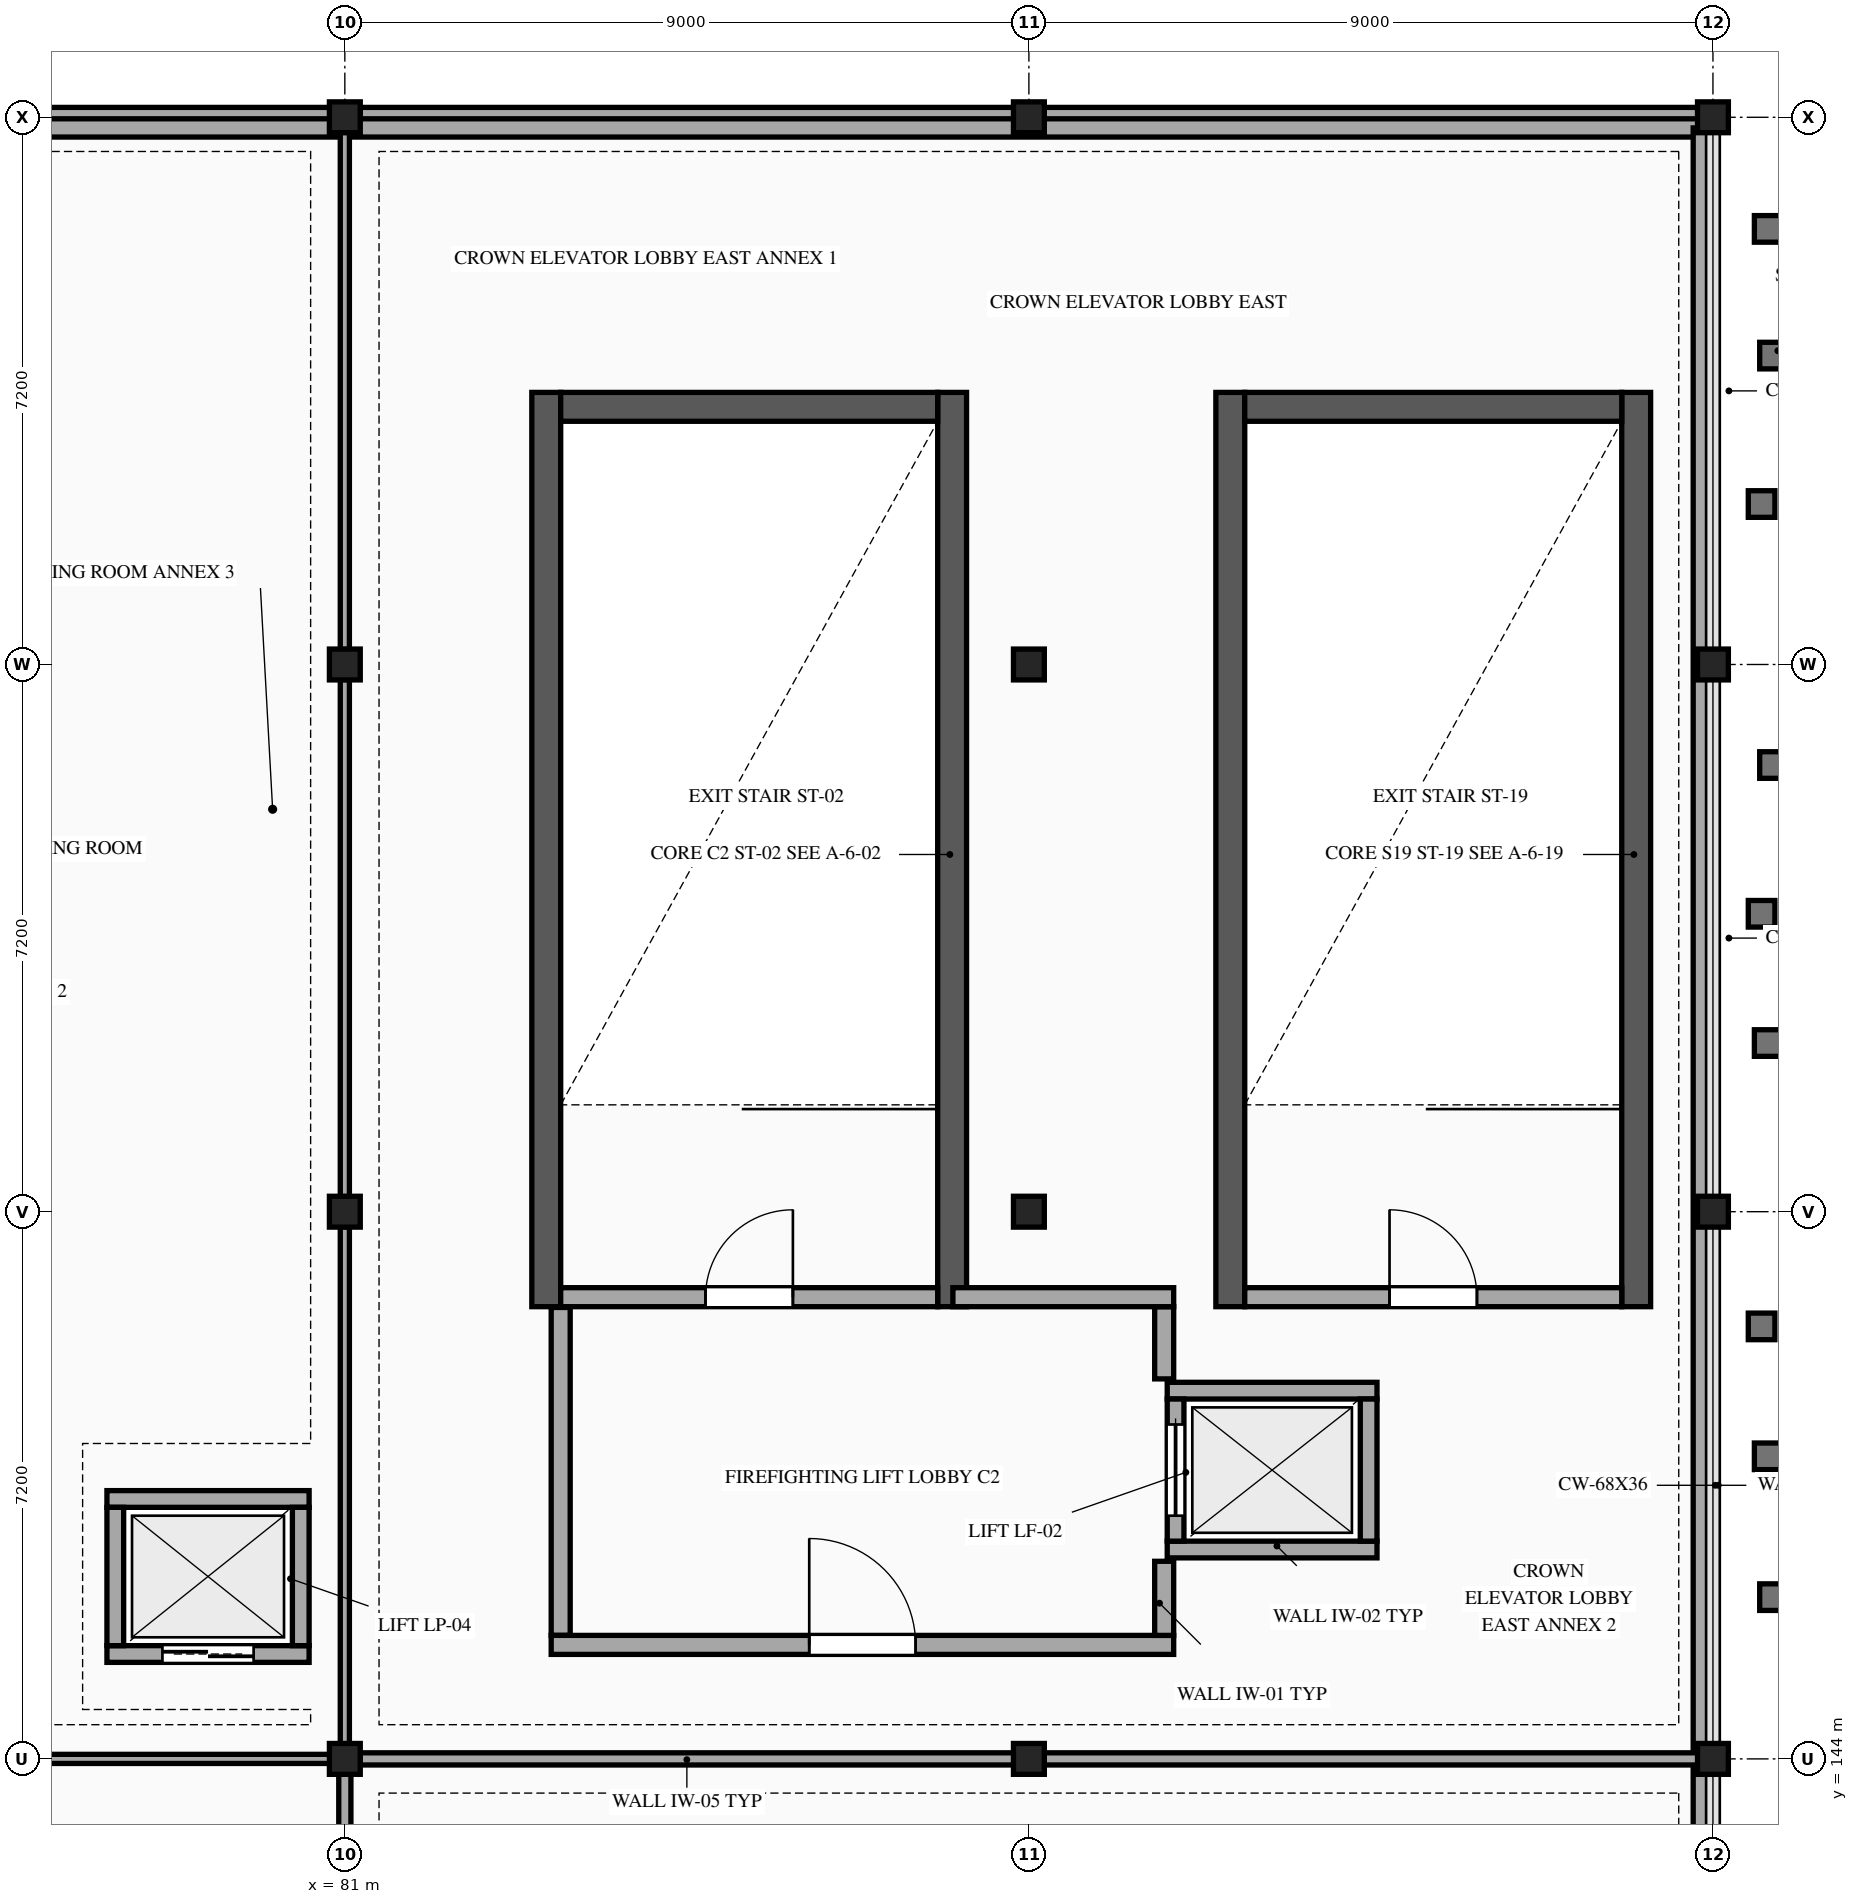
"""IFC4 building model, lengths in metres.
Left out: names, types, materials, properties, quantities, classifications, styles, units other than length and angle.
Written with IfcOpenShell. Run it as: python <this file> out.ifc"""

import sys

from ifc_helpers import new_model, si_unit, direction, frame, frame_2d, origin, origin_2d, place, context, subcontext, project, spatial, rectangle, hollow_circle, extrude, element, fill, save


model = new_model("IFC4")
c1 = context("Model", 3, precision=1e-05, world=origin(), true_north=direction((0.0, 1.0)))
c2 = subcontext(c1, "Body", "Model", "MODEL_VIEW")
j1 = project(units=[si_unit("LENGTHUNIT", "METRE"), si_unit("PLANEANGLEUNIT", "RADIAN")], contexts=[c1])
p1 = place(None, origin())
s1 = spatial("IfcSite", under=j1, at=p1, CompositionType="ELEMENT")
p2 = place(p1, origin())
s2 = spatial("IfcBuilding", under=s1, at=p2, CompositionType="ELEMENT")
p3 = place(p2, frame((0.0, 0.0, 24.3)))
s3 = spatial("IfcBuildingStorey", under=s2, at=p3, CompositionType="ELEMENT", Elevation=24.3)
for number, where, z_axis, x_axis in (
    (1, (81.0, 144.0, 0.0), (0.0, 0.0, 1.0), (1.0, 0.0, 0.0)),
    (2, (81.0, 151.2, 0.0), (0.0, 0.0, 1.0), (1.0, 0.0, 0.0)),
    (3, (81.0, 158.4, 0.0), (0.0, 0.0, 1.0), (1.0, 0.0, 0.0)),
    (4, (81.0, 165.6, 0.0), (0.0, 0.0, 1.0), (1.0, 0.0, 0.0)),
    (5, (90.0, 144.0, 0.0), (0.0, 0.0, 1.0), (1.0, 0.0, 0.0)),
    (6, (90.0, 151.2, 0.0), (0.0, 0.0, 1.0), (1.0, 0.0, 0.0)),
    (7, (90.0, 158.4, 0.0), (0.0, 0.0, 1.0), (1.0, 0.0, 0.0)),
    (8, (90.0, 165.6, 0.0), (0.0, 0.0, 1.0), (1.0, 0.0, 0.0)),
    (9, (99.0, 144.0, 0.0), (0.0, 0.0, 1.0), (1.0, 0.0, 0.0)),
    (10, (99.0, 151.2, 0.0), (0.0, 0.0, 1.0), (1.0, 0.0, 0.0)),
    (11, (99.0, 158.4, 0.0), (0.0, 0.0, 1.0), (1.0, 0.0, 0.0)),
    (12, (99.0, 165.6, 0.0), (0.0, 0.0, 1.0), (1.0, 0.0, 0.0)),
):
    element("IfcColumn", number, at=place(p3, frame(where, z_axis=z_axis, x_axis=x_axis)), inside=s3, PredefinedType="COLUMN", context=c2, shape_type="SweptSolid", body=[
        extrude(hollow_circle(Radius=0.203, WallThickness=0.014, at=origin_2d()), origin(), (0.0, 0.0, 1.0), 4.5),
    ])
for number, where, z_axis, x_axis in (
    (13, (83.65, 149.95, 0.0), (0.0, 0.0, 1.0), (0.0, 1.0, 0.0)),
    (14, (88.99, 161.98, 0.0), (0.0, 0.0, 1.0), (0.0, -1.0, 0.0)),
):
    element("IfcWall", number, at=place(p3, frame(where, z_axis=z_axis, x_axis=x_axis)), inside=s3, PredefinedType="SHEAR", context=c2, shape_type="SweptSolid", body=[
        extrude(rectangle(XDim=12.03, YDim=0.38, at=frame_2d((6.015, 0.0))), origin(), (0.0, 0.0, 1.0), 4.26),
    ])
p4 = place(p3, frame((83.84, 161.79, 0.0), z_axis=(0.0, 0.0, 1.0), x_axis=(1.0, 0.0, 0.0)))
e15 = element("IfcWall", 15, at=p4, inside=s3, PredefinedType="SHEAR", context=c2, shape_type="SweptSolid", body=[
    extrude(rectangle(XDim=4.96, YDim=0.38, at=frame_2d((2.48, 0.0))), origin(), (0.0, 0.0, 1.0), 4.26),
])
for number, where, z_axis, x_axis in (
    (16, (92.65, 149.95, 0.0), (0.0, 0.0, 1.0), (0.0, 1.0, 0.0)),
    (17, (97.99, 161.98, 0.0), (0.0, 0.0, 1.0), (0.0, -1.0, 0.0)),
):
    element("IfcWall", number, at=place(p3, frame(where, z_axis=z_axis, x_axis=x_axis)), inside=s3, PredefinedType="SHEAR", context=c2, shape_type="SweptSolid", body=[
        extrude(rectangle(XDim=12.03, YDim=0.38, at=frame_2d((6.015, 0.0))), origin(), (0.0, 0.0, 1.0), 4.26),
    ])
p5 = place(p3, frame((92.84, 161.79, 0.0), z_axis=(0.0, 0.0, 1.0), x_axis=(1.0, 0.0, 0.0)))
e18 = element("IfcWall", 18, at=p5, inside=s3, PredefinedType="SHEAR", context=c2, shape_type="SweptSolid", body=[
    extrude(rectangle(XDim=4.96, YDim=0.38, at=frame_2d((2.48, 0.0))), origin(), (0.0, 0.0, 1.0), 4.26),
])
for number, where, z_axis, x_axis in (
    (19, (72.199, 165.6, 0.0), (0.0, 0.0, 1.0), (1.0, 0.0, 0.0)),
    (20, (81.199, 165.6, 0.0), (0.0, 0.0, 1.0), (1.0, 0.0, 0.0)),
    (21, (90.199, 165.6, 0.0), (0.0, 0.0, 1.0), (1.0, 0.0, 0.0)),
):
    element("IfcWall", number, at=place(p3, frame(where, z_axis=z_axis, x_axis=x_axis)), inside=s3, PredefinedType="STANDARD", context=c2, shape_type="SweptSolid", body=[
        extrude(rectangle(XDim=8.602, YDim=0.26, at=frame_2d((4.301, 0.0))), origin(), (0.0, 0.0, 1.0), 3.648),
    ])
p6 = place(p3, frame((36.14, 165.46, 4.5), z_axis=(0.0, 0.0, 1.0), x_axis=(1.0, 0.0, 0.0)))
e22 = element("IfcWall", 22, at=p6, inside=s3, PredefinedType="PARAPET", context=c2, shape_type="SweptSolid", body=[
    extrude(rectangle(XDim=62.72, YDim=0.24, at=frame_2d((31.36, 0.0))), origin(), (0.0, 0.0, 1.0), 0.65),
])
p7 = place(p3, frame((98.86, 165.46, 4.5), z_axis=(0.0, 0.0, 1.0), x_axis=(0.0, -1.0, 0.0)))
e23 = element("IfcWall", 23, at=p7, inside=s3, PredefinedType="PARAPET", context=c2, shape_type="SweptSolid", body=[
    extrude(rectangle(XDim=35.72, YDim=0.24, at=frame_2d((17.86, 0.0))), origin(), (0.0, 0.0, 1.0), 0.65),
])
p8 = place(p3, frame((83.84, 150.075, 0.0), z_axis=(0.0, 0.0, 1.0), x_axis=(1.0, 0.0, 0.0)))
e24 = element("IfcWall", 24, at=p8, inside=s3, PredefinedType="STANDARD", context=c2, shape_type="SweptSolid", body=[
    extrude(rectangle(XDim=4.96, YDim=0.25, at=frame_2d((2.48, 0.0))), origin(), (0.0, 0.0, 1.0), 4.26),
])
p9 = place(p8, frame((1.905, 0.0, 0.0)))
e25 = element("IfcOpeningElement", 25, at=p9, cuts=e24, PredefinedType="OPENING", context=c2, shape_type="SweptSolid", body=[
    extrude(rectangle(XDim=1.15, YDim=2.2, at=frame_2d((0.575, 1.1))), frame((0.0, 0.135, 0.0), z_axis=(0.0, -1.0, 0.0), x_axis=(1.0, 0.0, 0.0)), (0.0, 0.0, 1.0), 0.27),
])
for number, where, z_axis, x_axis in (
    (26, (91.82, 146.755, 0.0), (0.0, 0.0, 1.0), (1.0, 0.0, 0.0)),
    (27, (94.58, 148.845, 0.0), (0.0, 0.0, 1.0), (-1.0, 0.0, 0.0)),
):
    element("IfcWall", number, at=place(p3, frame(where, z_axis=z_axis, x_axis=x_axis)), inside=s3, PredefinedType="STANDARD", context=c2, shape_type="SweptSolid", body=[
        extrude(rectangle(XDim=2.76, YDim=0.22, at=frame_2d((1.38, 0.0))), origin(), (0.0, 0.0, 1.0), 4.26),
    ])
p10 = place(p3, frame((91.93, 148.735, 0.0), z_axis=(0.0, 0.0, 1.0), x_axis=(0.0, -1.0, 0.0)))
e28 = element("IfcWall", 28, at=p10, inside=s3, PredefinedType="STANDARD", context=c2, shape_type="SweptSolid", body=[
    extrude(rectangle(XDim=1.87, YDim=0.22, at=frame_2d((0.935, 0.0))), origin(), (0.0, 0.0, 1.0), 4.26),
])
p11 = place(p10, frame((0.335, 0.0, 0.0)))
e29 = element("IfcOpeningElement", 29, at=p11, cuts=e28, PredefinedType="OPENING", context=c2, shape_type="SweptSolid", body=[
    extrude(rectangle(XDim=1.2, YDim=2.2, at=frame_2d((0.6, 1.1))), frame((0.0, 0.12, 0.0), z_axis=(0.0, -1.0, 0.0), x_axis=(1.0, 0.0, 0.0)), (0.0, 0.0, 1.0), 0.24),
])
p12 = place(p3, frame((94.47, 146.865, 0.0), z_axis=(0.0, 0.0, 1.0), x_axis=(0.0, 1.0, 0.0)))
e30 = element("IfcWall", 30, at=p12, inside=s3, PredefinedType="STANDARD", context=c2, shape_type="SweptSolid", body=[
    extrude(rectangle(XDim=1.87, YDim=0.22, at=frame_2d((0.935, 0.0))), origin(), (0.0, 0.0, 1.0), 4.26),
])
p13 = place(p3, frame((77.87, 145.38, 0.0), z_axis=(0.0, 0.0, 1.0), x_axis=(1.0, 0.0, 0.0)))
e31 = element("IfcWall", 31, at=p13, inside=s3, PredefinedType="STANDARD", context=c2, shape_type="SweptSolid", body=[
    extrude(rectangle(XDim=2.66, YDim=0.22, at=frame_2d((1.33, 0.0))), origin(), (0.0, 0.0, 1.0), 4.26),
])
p14 = place(p13, frame((0.73, 0.0, 0.0)))
e32 = element("IfcOpeningElement", 32, at=p14, cuts=e31, PredefinedType="OPENING", context=c2, shape_type="SweptSolid", body=[
    extrude(rectangle(XDim=1.2, YDim=2.2, at=frame_2d((0.6, 1.1))), frame((0.0, 0.12, 0.0), z_axis=(0.0, -1.0, 0.0), x_axis=(1.0, 0.0, 0.0)), (0.0, 0.0, 1.0), 0.24),
])
p15 = place(p3, frame((80.53, 147.42, 0.0), z_axis=(0.0, 0.0, 1.0), x_axis=(-1.0, 0.0, 0.0)))
e33 = element("IfcWall", 33, at=p15, inside=s3, PredefinedType="STANDARD", context=c2, shape_type="SweptSolid", body=[
    extrude(rectangle(XDim=2.66, YDim=0.22, at=frame_2d((1.33, 0.0))), origin(), (0.0, 0.0, 1.0), 4.26),
])
for number, where, z_axis, x_axis in (
    (34, (77.98, 147.31, 0.0), (0.0, 0.0, 1.0), (0.0, -1.0, 0.0)),
    (35, (80.42, 145.49, 0.0), (0.0, 0.0, 1.0), (0.0, 1.0, 0.0)),
):
    element("IfcWall", number, at=place(p3, frame(where, z_axis=z_axis, x_axis=x_axis)), inside=s3, PredefinedType="STANDARD", context=c2, shape_type="SweptSolid", body=[
        extrude(rectangle(XDim=1.82, YDim=0.22, at=frame_2d((0.91, 0.0))), origin(), (0.0, 0.0, 1.0), 4.26),
    ])
p16 = place(p3, frame((92.84, 150.075, 0.0), z_axis=(0.0, 0.0, 1.0), x_axis=(1.0, 0.0, 0.0)))
e36 = element("IfcWall", 36, at=p16, inside=s3, PredefinedType="STANDARD", context=c2, shape_type="SweptSolid", body=[
    extrude(rectangle(XDim=4.96, YDim=0.25, at=frame_2d((2.48, 0.0))), origin(), (0.0, 0.0, 1.0), 4.26),
])
p17 = place(p16, frame((1.905, 0.0, 0.0)))
e37 = element("IfcOpeningElement", 37, at=p17, cuts=e36, PredefinedType="OPENING", context=c2, shape_type="SweptSolid", body=[
    extrude(rectangle(XDim=1.15, YDim=2.2, at=frame_2d((0.575, 1.1))), frame((0.0, 0.135, 0.0), z_axis=(0.0, -1.0, 0.0), x_axis=(1.0, 0.0, 0.0)), (0.0, 0.0, 1.0), 0.27),
])
p18 = place(p3, frame((83.84, 149.94, 0.0), z_axis=(0.0, 0.0, 1.0), x_axis=(0.0, -1.0, 0.0)))
e38 = element("IfcWall", 38, at=p18, inside=s3, PredefinedType="STANDARD", context=c2, shape_type="SweptSolid", body=[
    extrude(rectangle(XDim=4.315, YDim=0.25, at=frame_2d((2.157, 0.0))), origin(), (0.0, 0.0, 1.0), 3.648),
])
p19 = place(p3, frame((83.715, 145.5, 0.0), z_axis=(0.0, 0.0, 1.0), x_axis=(1.0, 0.0, 0.0)))
e39 = element("IfcWall", 39, at=p19, inside=s3, PredefinedType="STANDARD", context=c2, shape_type="SweptSolid", body=[
    extrude(rectangle(XDim=8.19, YDim=0.25, at=frame_2d((4.095, 0.0))), origin(), (0.0, 0.0, 1.0), 3.648),
])
p20 = place(p19, frame((3.395, 0.0, 0.0)))
e40 = element("IfcOpeningElement", 40, at=p20, cuts=e39, PredefinedType="OPENING", context=c2, shape_type="SweptSolid", body=[
    extrude(rectangle(XDim=1.4, YDim=2.2, at=frame_2d((0.7, 1.1))), frame((0.0, 0.135, 0.0), z_axis=(0.0, -1.0, 0.0), x_axis=(1.0, 0.0, 0.0)), (0.0, 0.0, 1.0), 0.27),
])
p21 = place(p3, frame((91.78, 145.625, 0.0), z_axis=(0.0, 0.0, 1.0), x_axis=(0.0, 1.0, 0.0)))
e41 = element("IfcWall", 41, at=p21, inside=s3, PredefinedType="STANDARD", context=c2, shape_type="SweptSolid", body=[
    extrude(rectangle(XDim=0.975, YDim=0.25, at=frame_2d((0.488, 0.0))), origin(), (0.0, 0.0, 1.0), 3.648),
])
p22 = place(p3, frame((91.78, 149.0, 0.0), z_axis=(0.0, 0.0, 1.0), x_axis=(0.0, 1.0, 0.0)))
e42 = element("IfcWall", 42, at=p22, inside=s3, PredefinedType="STANDARD", context=c2, shape_type="SweptSolid", body=[
    extrude(rectangle(XDim=0.95, YDim=0.25, at=frame_2d((0.475, 0.0))), origin(), (0.0, 0.0, 1.0), 3.648),
])
p23 = place(p3, frame((89.0, 150.075, 0.0), z_axis=(0.0, 0.0, 1.0), x_axis=(1.0, 0.0, 0.0)))
e43 = element("IfcWall", 43, at=p23, inside=s3, PredefinedType="STANDARD", context=c2, shape_type="SweptSolid", body=[
    extrude(rectangle(XDim=2.905, YDim=0.25, at=frame_2d((1.453, 0.0))), origin(), (0.0, 0.0, 1.0), 3.648),
])
p24 = place(p3, frame((76.5, 144.0, 0.0), z_axis=(0.0, 0.0, 1.0), x_axis=(1.0, 0.0, 0.0)))
e44 = element("IfcWall", 44, at=p24, inside=s3, PredefinedType="PARTITIONING", context=c2, shape_type="SweptSolid", body=[
    extrude(rectangle(XDim=4.301, YDim=0.12, at=frame_2d((2.15, 0.0))), origin(), (0.0, 0.0, 1.0), 3.648),
])
for number, where, z_axis, x_axis in (
    (45, (81.199, 144.0, 0.0), (0.0, 0.0, 1.0), (1.0, 0.0, 0.0)),
    (46, (90.199, 144.0, 0.0), (0.0, 0.0, 1.0), (1.0, 0.0, 0.0)),
):
    element("IfcWall", number, at=place(p3, frame(where, z_axis=z_axis, x_axis=x_axis)), inside=s3, PredefinedType="PARTITIONING", context=c2, shape_type="SweptSolid", body=[
        extrude(rectangle(XDim=8.602, YDim=0.16, at=frame_2d((4.301, 0.0))), origin(), (0.0, 0.0, 1.0), 3.648),
    ])
p25 = place(p3, frame((81.0, 136.999, 0.0), z_axis=(0.0, 0.0, 1.0), x_axis=(0.0, 1.0, 0.0)))
e47 = element("IfcWall", 47, at=p25, inside=s3, PredefinedType="PARTITIONING", context=c2, shape_type="SweptSolid", body=[
    extrude(rectangle(XDim=6.802, YDim=0.16, at=frame_2d((3.401, 0.0))), origin(), (0.0, 0.0, 1.0), 3.648),
])
p26 = place(p25, frame((2.501, 0.0, 0.0)))
e48 = element("IfcOpeningElement", 48, at=p26, cuts=e47, PredefinedType="OPENING", context=c2, shape_type="SweptSolid", body=[
    extrude(rectangle(XDim=1.8, YDim=2.25, at=frame_2d((0.9, 1.125))), frame((0.0, 0.09, 0.0), z_axis=(0.0, -1.0, 0.0), x_axis=(1.0, 0.0, 0.0)), (0.0, 0.0, 1.0), 0.18),
])
for number, where, z_axis, x_axis in (
    (49, (81.0, 144.199, 0.0), (0.0, 0.0, 1.0), (0.0, 1.0, 0.0)),
    (50, (81.0, 151.399, 0.0), (0.0, 0.0, 1.0), (0.0, 1.0, 0.0)),
):
    element("IfcWall", number, at=place(p3, frame(where, z_axis=z_axis, x_axis=x_axis)), inside=s3, PredefinedType="PARTITIONING", context=c2, shape_type="SweptSolid", body=[
        extrude(rectangle(XDim=6.802, YDim=0.12, at=frame_2d((3.401, 0.0))), origin(), (0.0, 0.0, 1.0), 3.648),
    ])
p27 = place(p3, frame((81.0, 158.599, 0.0), z_axis=(0.0, 0.0, 1.0), x_axis=(0.0, 1.0, 0.0)))
e51 = element("IfcWall", 51, at=p27, inside=s3, PredefinedType="PARTITIONING", context=c2, shape_type="SweptSolid", body=[
    extrude(rectangle(XDim=6.802, YDim=0.12, at=frame_2d((3.401, 0.0))), origin(), (0.0, 0.0, 1.0), 3.648),
])
p28 = place(p9, origin())
e52 = element("IfcDoor", 52, at=p28, inside=s3, OperationType="SINGLE_SWING_RIGHT", PredefinedType="DOOR", context=c2, shape_type="SweptSolid", body=[
    extrude(rectangle(XDim=1.15, YDim=2.2, at=frame_2d((0.575, 1.1))), frame((0.0, 0.025, 0.0), z_axis=(0.0, -1.0, 0.0), x_axis=(1.0, 0.0, 0.0)), (0.0, 0.0, 1.0), 0.05),
])
fill(e25, e52)
p29 = place(p11, origin())
e53 = element("IfcDoor", 53, at=p29, inside=s3, OperationType="DOUBLE_DOOR_SLIDING", PredefinedType="DOOR", context=c2, shape_type="SweptSolid", body=[
    extrude(rectangle(XDim=1.2, YDim=2.2, at=frame_2d((0.6, 1.1))), frame((0.0, 0.025, 0.0), z_axis=(0.0, -1.0, 0.0), x_axis=(1.0, 0.0, 0.0)), (0.0, 0.0, 1.0), 0.05),
])
fill(e29, e53)
p30 = place(p14, origin())
e54 = element("IfcDoor", 54, at=p30, inside=s3, OperationType="DOUBLE_DOOR_SLIDING", PredefinedType="DOOR", context=c2, shape_type="SweptSolid", body=[
    extrude(rectangle(XDim=1.2, YDim=2.2, at=frame_2d((0.6, 1.1))), frame((0.0, 0.025, 0.0), z_axis=(0.0, -1.0, 0.0), x_axis=(1.0, 0.0, 0.0)), (0.0, 0.0, 1.0), 0.05),
])
fill(e32, e54)
p31 = place(p17, origin())
e55 = element("IfcDoor", 55, at=p31, inside=s3, OperationType="SINGLE_SWING_LEFT", PredefinedType="DOOR", context=c2, shape_type="SweptSolid", body=[
    extrude(rectangle(XDim=1.15, YDim=2.2, at=frame_2d((0.575, 1.1))), frame((0.0, 0.025, 0.0), z_axis=(0.0, -1.0, 0.0), x_axis=(1.0, 0.0, 0.0)), (0.0, 0.0, 1.0), 0.05),
])
fill(e37, e55)
p32 = place(p20, origin())
e56 = element("IfcDoor", 56, at=p32, inside=s3, OperationType="SINGLE_SWING_LEFT", PredefinedType="DOOR", context=c2, shape_type="SweptSolid", body=[
    extrude(rectangle(XDim=1.4, YDim=2.2, at=frame_2d((0.7, 1.1))), frame((0.0, 0.025, 0.0), z_axis=(0.0, -1.0, 0.0), x_axis=(1.0, 0.0, 0.0)), (0.0, 0.0, 1.0), 0.05),
])
fill(e40, e56)
save(model, sys.argv[1])
